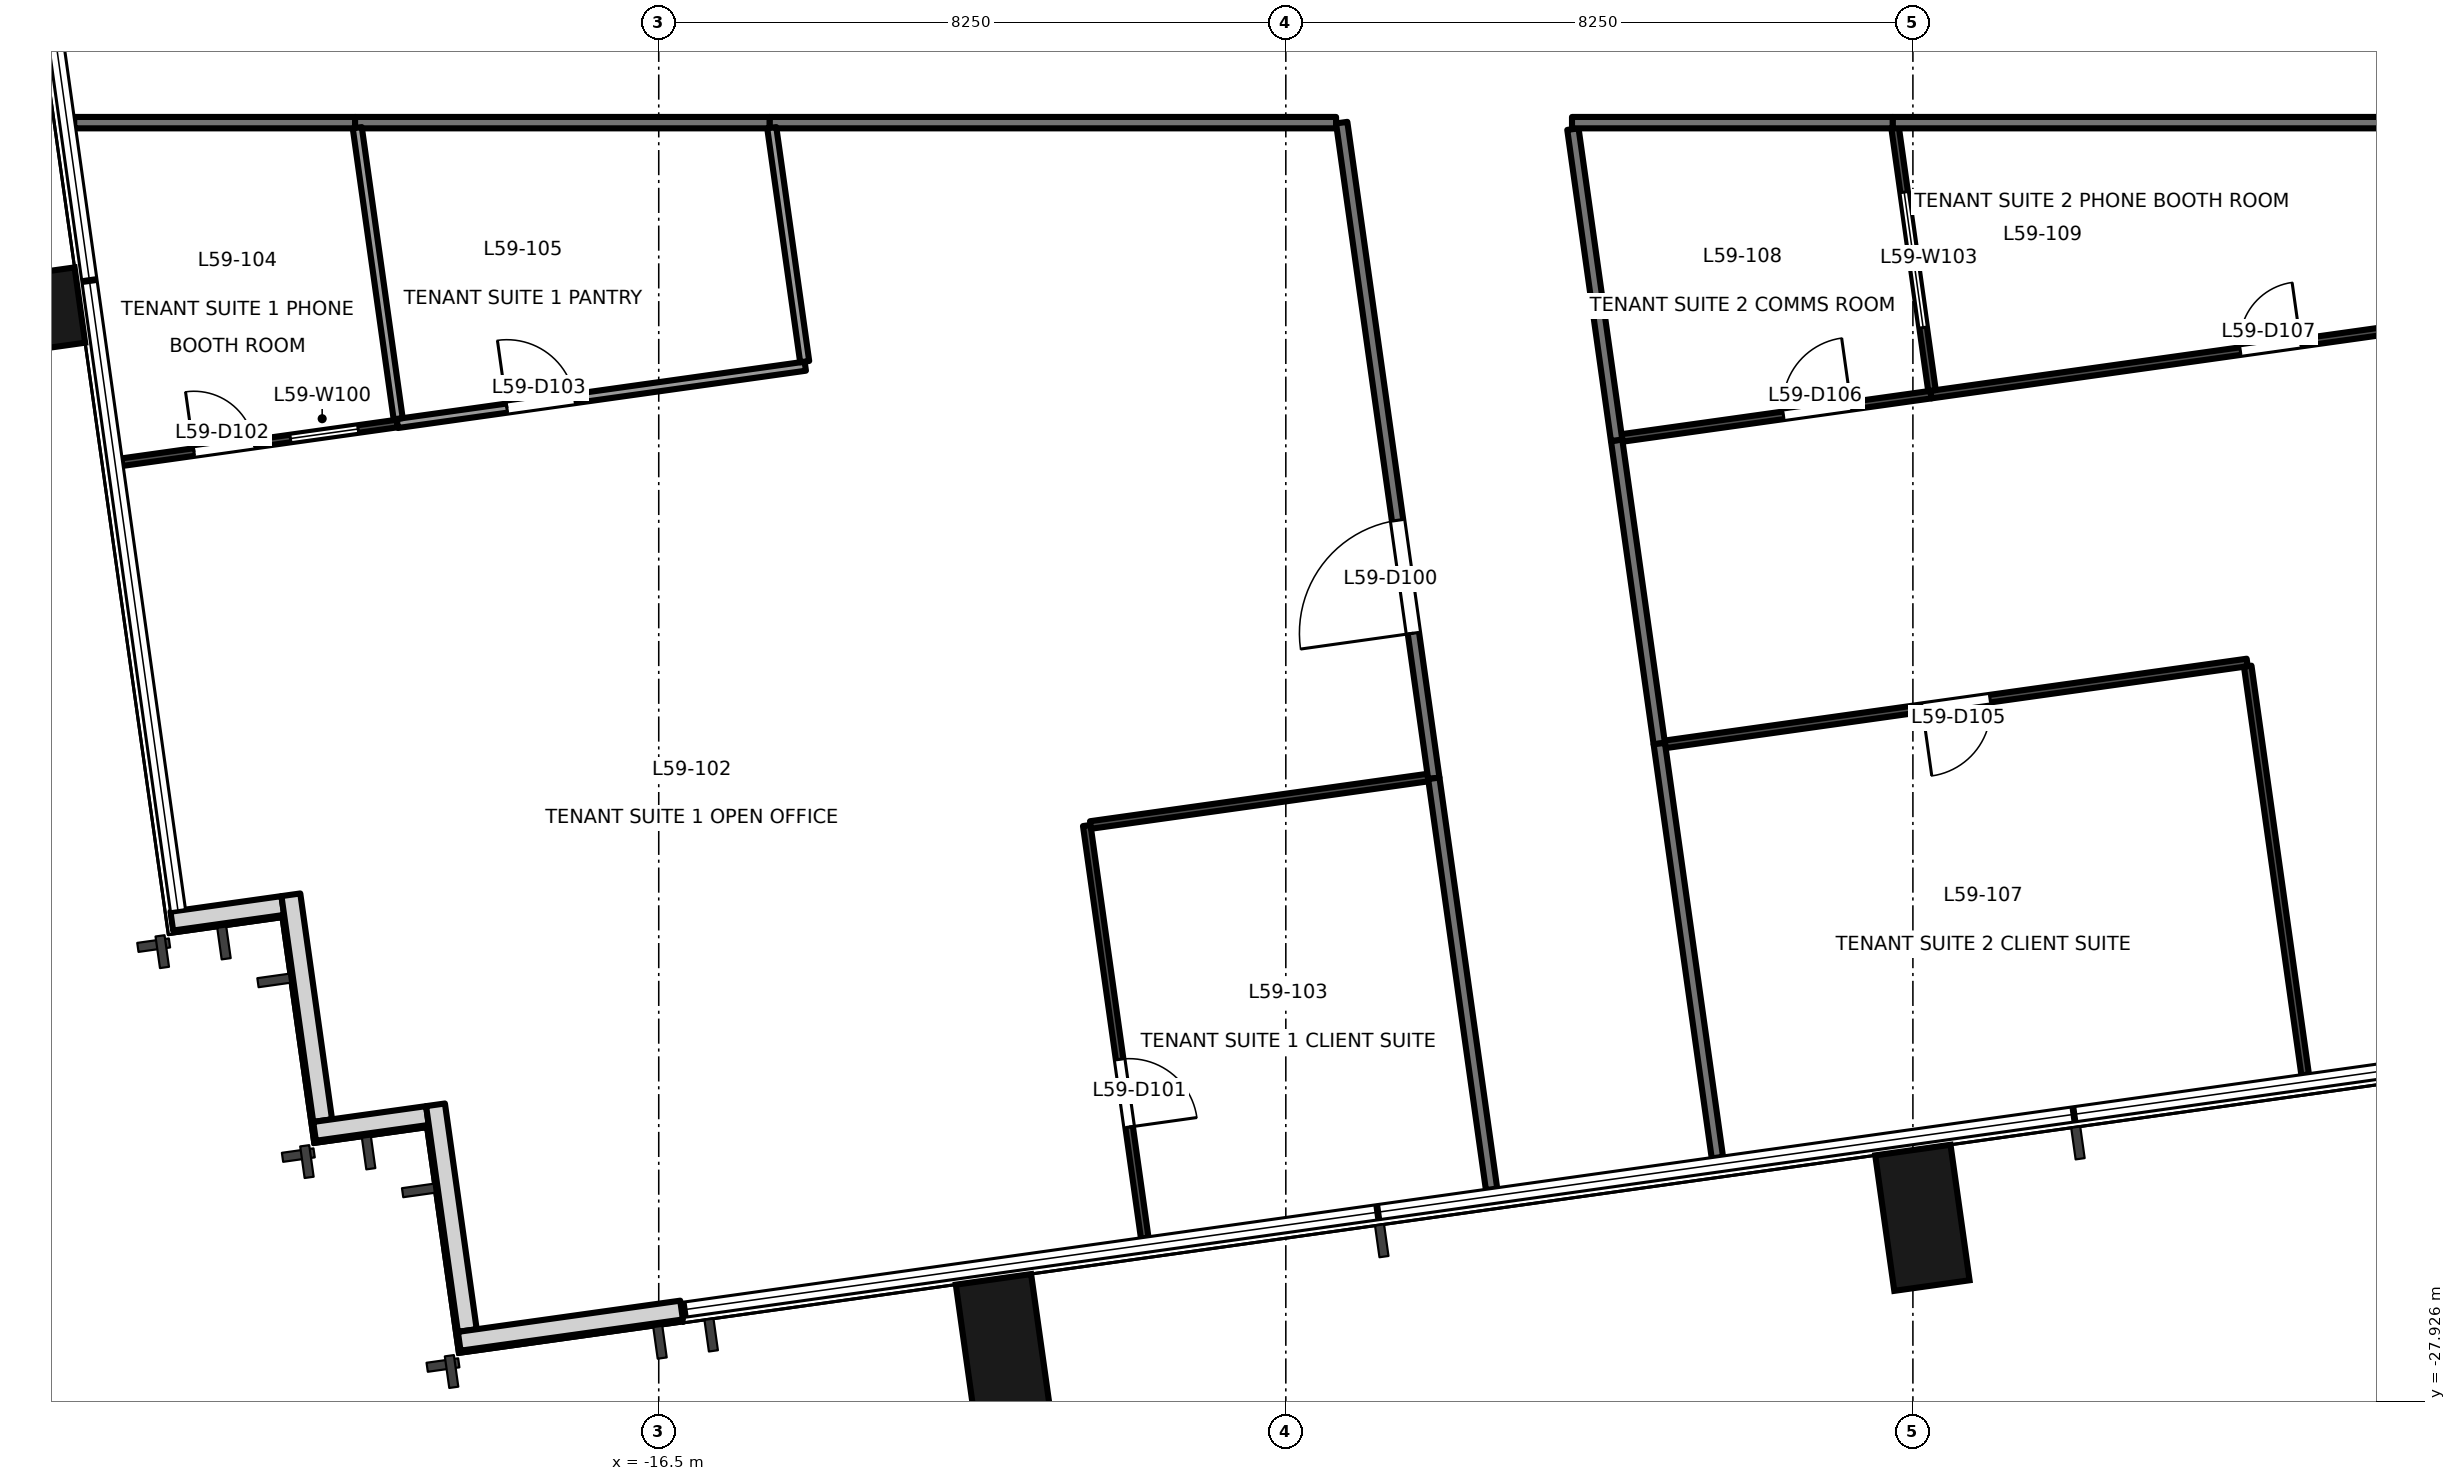
"""IFC4 building model, lengths in metres.
Left out: names, types, materials, properties, quantities, classifications, styles, units other than length and angle.
Written with IfcOpenShell. Run it as: python <this file> out.ifc"""

import sys

from ifc_helpers import new_model, si_unit, direction, frame, frame_2d, origin, origin_2d, place, context, subcontext, project, spatial, rectangle, extrude, element, fill, save


model = new_model("IFC4")
c1 = context("Model", 3, precision=1e-05, world=origin(), true_north=direction((0.0, 1.0)))
c2 = subcontext(c1, "Body", "Model", "MODEL_VIEW")
j1 = project(units=[si_unit("LENGTHUNIT", "METRE"), si_unit("PLANEANGLEUNIT", "RADIAN")], contexts=[c1])
p1 = place(None, origin())
s1 = spatial("IfcSite", under=j1, at=p1, CompositionType="ELEMENT")
p2 = place(p1, origin())
s2 = spatial("IfcBuilding", under=s1, at=p2, CompositionType="ELEMENT")
p3 = place(p2, frame((0.0, 0.0, 259.0)))
s3 = spatial("IfcBuildingStorey", under=s2, at=p3, CompositionType="ELEMENT", Elevation=259.0)
for number, where, z_axis, x_axis in (
    (1, (-11.971, -27.209, -0.2), (0.0, 0.0, 1.0), (0.99, 0.139, 0.0)),
    (2, (0.125, -25.508, -0.2), (0.0, 0.0, 1.0), (0.99, 0.139, 0.0)),
    (3, (-25.007, -13.625, -0.2), (0.0, 0.0, 1.0), (-0.139, 0.99, 0.0)),
):
    element("IfcColumn", number, at=place(p3, frame(where, z_axis=z_axis, x_axis=x_axis)), inside=s3, PredefinedType="COLUMN", context=c2, shape_type="SweptSolid", body=[
        extrude(rectangle(XDim=1.0, YDim=1.8, at=origin_2d()), origin(), (0.0, 0.0, 1.0), 3.9),
    ])
p4 = place(p3, frame((-22.906, -21.605, 0.0), z_axis=(0.0, 0.0, 1.0), x_axis=(0.990235520307, 0.13940449893, 0.0)))
e4 = element("IfcWall", 4, at=p4, inside=s3, PredefinedType="SOLIDWALL", context=c2, shape_type="SweptSolid", body=[
    extrude(rectangle(XDim=1.475, YDim=0.25, at=frame_2d((0.737, 0.0))), origin(), (0.0, 0.0, 1.0), 3.7),
])
p5 = place(p3, frame((-21.34, -21.258, 0.0), z_axis=(0.0, 0.0, 1.0), x_axis=(0.139393225799, -0.990237107263, 0.0)))
e5 = element("IfcWall", 5, at=p5, inside=s3, PredefinedType="SOLIDWALL", context=c2, shape_type="SweptSolid", body=[
    extrude(rectangle(XDim=3.0, YDim=0.25, at=frame_2d((1.5, 0.0))), origin(), (0.0, 0.0, 1.0), 3.7),
])
p6 = place(p3, frame((-21.028, -24.37, 0.0), z_axis=(0.0, 0.0, 1.0), x_axis=(0.990330117064, 0.138730887823, 0.0)))
e6 = element("IfcWall", 6, at=p6, inside=s3, PredefinedType="SOLIDWALL", context=c2, shape_type="SweptSolid", body=[
    extrude(rectangle(XDim=1.499, YDim=0.25, at=frame_2d((0.75, 0.0))), origin(), (0.0, 0.0, 1.0), 3.7),
])
p7 = place(p3, frame((-19.437, -24.021, 0.0), z_axis=(0.0, 0.0, 1.0), x_axis=(0.139358350296, -0.990242015975, 0.0)))
e7 = element("IfcWall", 7, at=p7, inside=s3, PredefinedType="SOLIDWALL", context=c2, shape_type="SweptSolid", body=[
    extrude(rectangle(XDim=2.999, YDim=0.25, at=frame_2d((1.5, 0.0))), origin(), (0.0, 0.0, 1.0), 3.7),
])
p8 = place(p3, frame((-19.125, -27.132, 0.0), z_axis=(0.0, 0.0, 1.0), x_axis=(0.990291981483, 0.139002846771, 0.0)))
e8 = element("IfcWall", 8, at=p8, inside=s3, PredefinedType="SOLIDWALL", context=c2, shape_type="SweptSolid", body=[
    extrude(rectangle(XDim=2.954, YDim=0.25, at=frame_2d((1.477, 0.0))), origin(), (0.0, 0.0, 1.0), 3.7),
])
p9 = place(p3, frame((-7.589, -11.1, 0.0), z_axis=(0.0, 0.0, 1.0), x_axis=(-1.0, 0.0, 0.0)))
e9 = element("IfcWall", 9, at=p9, inside=s3, PredefinedType="PARTITIONING", context=c2, shape_type="SweptSolid", body=[
    extrude(rectangle(XDim=7.453, YDim=0.15, at=frame_2d((3.727, 0.0))), origin(), (0.0, 0.0, 1.0), 2.8),
])
p10 = place(p3, frame((-6.303, -19.726, 0.0), z_axis=(0.0, 0.0, 1.0), x_axis=(-0.139129433731, 0.990274204789, 0.0)))
e10 = element("IfcWall", 10, at=p10, inside=s3, PredefinedType="PARTITIONING", context=c2, shape_type="SweptSolid", body=[
    extrude(rectangle(XDim=8.711, YDim=0.15, at=frame_2d((4.355, 0.0))), origin(), (0.0, 0.0, 1.0), 3.7),
])
p11 = place(p10, frame((1.928, 0.0, 0.0)))
e11 = element("IfcOpeningElement", 11, at=p11, cuts=e10, PredefinedType="OPENING", context=c2, shape_type="SweptSolid", body=[
    extrude(rectangle(XDim=1.5, YDim=2.1, at=frame_2d((0.75, 1.05))), frame((0.0, 0.085, 0.0), z_axis=(0.0, -1.0, 0.0), x_axis=(1.0, 0.0, 0.0)), (0.0, 0.0, 1.0), 0.171),
])
p12 = place(p3, frame((-5.543, -25.133, 0.0), z_axis=(0.0, 0.0, 1.0), x_axis=(-0.139192487281, 0.990265343978, 0.0)))
e12 = element("IfcWall", 12, at=p12, inside=s3, PredefinedType="PARTITIONING", context=c2, shape_type="SweptSolid", body=[
    extrude(rectangle(XDim=5.46, YDim=0.15, at=frame_2d((2.73, 0.0))), origin(), (0.0, 0.0, 1.0), 3.7),
])
p13 = place(p3, frame((-20.495, -11.1, 0.0), z_axis=(0.0, 0.0, 1.0), x_axis=(-1.0, 0.0, 0.0)))
e13 = element("IfcWall", 13, at=p13, inside=s3, PredefinedType="PARTITIONING", context=c2, shape_type="SweptSolid", body=[
    extrude(rectangle(XDim=3.695, YDim=0.15, at=frame_2d((1.847, 0.0))), origin(), (0.0, 0.0, 1.0), 3.7),
])
p14 = place(p3, frame((-15.042, -11.1, 0.0), z_axis=(0.0, 0.0, 1.0), x_axis=(-1.0, 0.0, 0.0)))
e14 = element("IfcWall", 14, at=p14, inside=s3, PredefinedType="PARTITIONING", context=c2, shape_type="SweptSolid", body=[
    extrude(rectangle(XDim=5.453, YDim=0.15, at=frame_2d((2.727, 0.0))), origin(), (0.0, 0.0, 1.0), 3.7),
])
p15 = place(p3, frame((-3.898, -15.279, 0.0), z_axis=(0.0, 0.0, 1.0), x_axis=(0.139240905476, -0.990258537071, 0.0)))
e15 = element("IfcWall", 15, at=p15, inside=s3, PredefinedType="PARTITIONING", context=c2, shape_type="SweptSolid", body=[
    extrude(rectangle(XDim=4.029, YDim=0.15, at=frame_2d((2.015, 0.0))), origin(), (0.0, 0.0, 1.0), 3.7),
])
p16 = place(p3, frame((-3.337, -19.269, 0.0), z_axis=(0.0, 0.0, 1.0), x_axis=(0.139059647431, -0.990284006968, 0.0)))
e16 = element("IfcWall", 16, at=p16, inside=s3, PredefinedType="PARTITIONING", context=c2, shape_type="SweptSolid", body=[
    extrude(rectangle(XDim=5.5, YDim=0.15, at=frame_2d((2.75, 0.0))), origin(), (0.0, 0.0, 1.0), 3.7),
])
p17 = place(p3, frame((-4.473, -11.185, 0.0), z_axis=(0.0, 0.0, 1.0), x_axis=(0.1390729581, -0.990282137739, 0.0)))
e17 = element("IfcWall", 17, at=p17, inside=s3, PredefinedType="PARTITIONING", context=c2, shape_type="SweptSolid", body=[
    extrude(rectangle(XDim=4.134, YDim=0.15, at=frame_2d((2.067, 0.0))), origin(), (0.0, 0.0, 1.0), 2.8),
])
p18 = place(p3, frame((-0.264, -11.1, 0.0), z_axis=(0.0, 0.0, 1.0), x_axis=(-1.0, 0.0, 0.0)))
e18 = element("IfcWall", 18, at=p18, inside=s3, PredefinedType="PARTITIONING", context=c2, shape_type="SweptSolid", body=[
    extrude(rectangle(XDim=4.221, YDim=0.15, at=frame_2d((2.111, 0.0))), origin(), (0.0, 0.0, 1.0), 2.8),
])
p19 = place(p3, frame((8.824, -11.1, 0.0), z_axis=(0.0, 0.0, 1.0), x_axis=(-1.0, 0.0, 0.0)))
e19 = element("IfcWall", 19, at=p19, inside=s3, PredefinedType="PARTITIONING", context=c2, shape_type="SweptSolid", body=[
    extrude(rectangle(XDim=9.088, YDim=0.15, at=frame_2d((4.544, 0.0))), origin(), (0.0, 0.0, 1.0), 2.9),
])
p20 = place(p3, frame((-10.869, -20.347, 0.0), z_axis=(0.0, 0.0, 1.0), x_axis=(0.139213194633, -0.990262433116, 0.0)))
e20 = element("IfcWall", 20, at=p20, inside=s3, PredefinedType="PARTITIONING", context=c2, shape_type="SweptSolid", body=[
    extrude(rectangle(XDim=5.48, YDim=0.1, at=frame_2d((2.74, 0.0))), origin(), (0.0, 0.0, 1.0), 3.7),
])
p21 = place(p20, frame((3.106, 0.0, 0.0)))
e21 = element("IfcOpeningElement", 21, at=p21, cuts=e20, PredefinedType="OPENING", context=c2, shape_type="SweptSolid", body=[
    extrude(rectangle(XDim=0.9, YDim=2.1, at=frame_2d((0.45, 1.05))), frame((0.0, 0.061, 0.0), z_axis=(0.0, -1.0, 0.0), x_axis=(1.0, 0.0, 0.0)), (0.0, 0.0, 1.0), 0.121),
])
p22 = place(p3, frame((-6.38, -19.716, 0.0), z_axis=(0.0, 0.0, 1.0), x_axis=(-0.990263970159, -0.139202260778, 0.0)))
e22 = element("IfcWall", 22, at=p22, inside=s3, PredefinedType="PARTITIONING", context=c2, shape_type="SweptSolid", body=[
    extrude(rectangle(XDim=4.483, YDim=0.1, at=frame_2d((2.241, 0.0))), origin(), (0.0, 0.0, 1.0), 2.8),
])
p23 = place(p3, frame((-23.563, -15.567, 0.0), z_axis=(0.0, 0.0, 1.0), x_axis=(0.990288176908, 0.139029948846, 0.0)))
e23 = element("IfcWall", 23, at=p23, inside=s3, PredefinedType="PARTITIONING", context=c2, shape_type="SweptSolid", body=[
    extrude(rectangle(XDim=3.66, YDim=0.1, at=frame_2d((1.83, 0.0))), origin(), (0.0, 0.0, 1.0), 3.7),
])
p24 = place(p23, frame((0.958, 0.0, 0.0)))
e24 = element("IfcOpeningElement", 24, at=p24, cuts=e23, PredefinedType="OPENING", context=c2, shape_type="SweptSolid", body=[
    extrude(rectangle(XDim=0.8, YDim=2.1, at=frame_2d((0.4, 1.05))), frame((0.0, 0.061, 0.0), z_axis=(0.0, -1.0, 0.0), x_axis=(1.0, 0.0, 0.0)), (0.0, 0.0, 1.0), 0.121),
])
p25 = place(p23, frame((2.239, 0.0, 0.9)))
e25 = element("IfcOpeningElement", 25, at=p25, cuts=e23, PredefinedType="OPENING", context=c2, shape_type="SweptSolid", body=[
    extrude(rectangle(XDim=0.9, YDim=1.2, at=frame_2d((0.45, 0.6))), frame((0.0, 0.061, 0.0), z_axis=(0.0, -1.0, 0.0), x_axis=(1.0, 0.0, 0.0)), (0.0, 0.0, 1.0), 0.121),
])
p26 = place(p3, frame((-19.939, -15.058, 0.0), z_axis=(0.0, 0.0, 1.0), x_axis=(0.99027122958, 0.139150608569, 0.0)))
e26 = element("IfcWall", 26, at=p26, inside=s3, PredefinedType="PARTITIONING", context=c2, shape_type="SweptSolid", body=[
    extrude(rectangle(XDim=5.42, YDim=0.12, at=frame_2d((2.71, 0.0))), origin(), (0.0, 0.0, 1.0), 3.7),
])
p27 = place(p26, frame((1.456, 0.0, 0.0)))
e27 = element("IfcOpeningElement", 27, at=p27, cuts=e26, PredefinedType="OPENING", context=c2, shape_type="SweptSolid", body=[
    extrude(rectangle(XDim=0.9, YDim=2.1, at=frame_2d((0.45, 1.05))), frame((0.0, 0.071, 0.0), z_axis=(0.0, -1.0, 0.0), x_axis=(1.0, 0.0, 0.0)), (0.0, 0.0, 1.0), 0.141),
])
p28 = place(p3, frame((-14.58, -14.244, 0.0), z_axis=(0.0, 0.0, 1.0), x_axis=(-0.139309006135, 0.990248959005, 0.0)))
e28 = element("IfcWall", 28, at=p28, inside=s3, PredefinedType="PARTITIONING", context=c2, shape_type="SweptSolid", body=[
    extrude(rectangle(XDim=3.107, YDim=0.12, at=frame_2d((1.554, 0.0))), origin(), (0.0, 0.0, 1.0), 3.7),
])
p29 = place(p3, frame((-20.466, -11.167, 0.0), z_axis=(0.0, 0.0, 1.0), x_axis=(0.139192901143, -0.990265285806, 0.0)))
e29 = element("IfcWall", 29, at=p29, inside=s3, PredefinedType="PARTITIONING", context=c2, shape_type="SweptSolid", body=[
    extrude(rectangle(XDim=3.866, YDim=0.12, at=frame_2d((1.933, 0.0))), origin(), (0.0, 0.0, 1.0), 3.7),
])
p30 = place(p3, frame((4.398, -18.202, 0.0), z_axis=(0.0, 0.0, 1.0), x_axis=(-0.990252156894, -0.139286272714, 0.0)))
e30 = element("IfcWall", 30, at=p30, inside=s3, PredefinedType="PARTITIONING", context=c2, shape_type="SweptSolid", body=[
    extrude(rectangle(XDim=7.733, YDim=0.1, at=frame_2d((3.867, 0.0))), origin(), (0.0, 0.0, 1.0), 2.9),
])
p31 = place(p30, frame((3.417, 0.0, 0.0)))
e31 = element("IfcOpeningElement", 31, at=p31, cuts=e30, PredefinedType="OPENING", context=c2, shape_type="SweptSolid", body=[
    extrude(rectangle(XDim=0.9, YDim=2.1, at=frame_2d((0.45, 1.05))), frame((0.0, 0.061, 0.0), z_axis=(0.0, -1.0, 0.0), x_axis=(1.0, 0.0, 0.0)), (0.0, 0.0, 1.0), 0.121),
])
p32 = place(p3, frame((5.161, -23.628, 0.0), z_axis=(0.0, 0.0, 1.0), x_axis=(-0.139205228836, 0.990263552932, 0.0)))
e32 = element("IfcWall", 32, at=p32, inside=s3, PredefinedType="PARTITIONING", context=c2, shape_type="SweptSolid", body=[
    extrude(rectangle(XDim=5.43, YDim=0.1, at=frame_2d((2.715, 0.0))), origin(), (0.0, 0.0, 1.0), 2.9),
])
p33 = place(p3, frame((-3.826, -15.248, 0.0), z_axis=(0.0, 0.0, 1.0), x_axis=(0.990304461309, 0.138913908276, 0.0)))
e33 = element("IfcWall", 33, at=p33, inside=s3, PredefinedType="PARTITIONING", context=c2, shape_type="SweptSolid", body=[
    extrude(rectangle(XDim=4.104, YDim=0.1, at=frame_2d((2.052, 0.0))), origin(), (0.0, 0.0, 1.0), 2.9),
])
p34 = place(p33, frame((2.143, 0.0, 0.0)))
e34 = element("IfcOpeningElement", 34, at=p34, cuts=e33, PredefinedType="OPENING", context=c2, shape_type="SweptSolid", body=[
    extrude(rectangle(XDim=0.9, YDim=2.1, at=frame_2d((0.45, 1.05))), frame((0.0, 0.061, 0.0), z_axis=(0.0, -1.0, 0.0), x_axis=(1.0, 0.0, 0.0)), (0.0, 0.0, 1.0), 0.121),
])
p35 = place(p3, frame((0.238, -14.678, 0.0), z_axis=(0.0, 0.0, 1.0), x_axis=(0.990261534953, 0.139219583367, 0.0)))
e35 = element("IfcWall", 35, at=p35, inside=s3, PredefinedType="PARTITIONING", context=c2, shape_type="SweptSolid", body=[
    extrude(rectangle(XDim=9.021, YDim=0.1, at=frame_2d((4.51, 0.0))), origin(), (0.0, 0.0, 1.0), 2.9),
])
p36 = place(p35, frame((4.11, 0.0, 0.0)))
e36 = element("IfcOpeningElement", 36, at=p36, cuts=e35, PredefinedType="OPENING", context=c2, shape_type="SweptSolid", body=[
    extrude(rectangle(XDim=0.8, YDim=2.1, at=frame_2d((0.4, 1.05))), frame((0.0, 0.061, 0.0), z_axis=(0.0, -1.0, 0.0), x_axis=(1.0, 0.0, 0.0)), (0.0, 0.0, 1.0), 0.121),
])
p37 = place(p35, frame((6.041, 0.0, 0.9)))
e37 = element("IfcOpeningElement", 37, at=p37, cuts=e35, PredefinedType="OPENING", context=c2, shape_type="SweptSolid", body=[
    extrude(rectangle(XDim=1.8, YDim=1.2, at=frame_2d((0.9, 0.6))), frame((0.0, 0.061, 0.0), z_axis=(0.0, -1.0, 0.0), x_axis=(1.0, 0.0, 0.0)), (0.0, 0.0, 1.0), 0.121),
])
p38 = place(p3, frame((-0.234, -11.168, 0.0), z_axis=(0.0, 0.0, 1.0), x_axis=(0.138894773338, -0.990307145253, 0.0)))
e38 = element("IfcWall", 38, at=p38, inside=s3, PredefinedType="PARTITIONING", context=c2, shape_type="SweptSolid", body=[
    extrude(rectangle(XDim=3.491, YDim=0.1, at=frame_2d((1.746, 0.0))), origin(), (0.0, 0.0, 1.0), 2.9),
])
p39 = place(p38, frame((0.854, 0.0, 0.9)))
e39 = element("IfcOpeningElement", 39, at=p39, cuts=e38, PredefinedType="OPENING", context=c2, shape_type="SweptSolid", body=[
    extrude(rectangle(XDim=1.8, YDim=1.2, at=frame_2d((0.9, 0.6))), frame((0.0, 0.061, 0.0), z_axis=(0.0, -1.0, 0.0), x_axis=(1.0, 0.0, 0.0)), (0.0, 0.0, 1.0), 0.121),
])
p40 = place(p11, origin())
e40 = element("IfcDoor", 40, at=p40, inside=s3, OperationType="DOUBLE_DOOR_SINGLE_SWING", PredefinedType="DOOR", context=c2, shape_type="SweptSolid", body=[
    extrude(rectangle(XDim=1.5, YDim=2.1, at=frame_2d((0.75, 1.05))), frame((0.0, 0.025, 0.0), z_axis=(0.0, -1.0, 0.0), x_axis=(1.0, 0.0, 0.0)), (0.0, 0.0, 1.0), 0.05),
])
fill(e11, e40)
p41 = place(p21, origin())
e41 = element("IfcDoor", 41, at=p41, inside=s3, OperationType="SINGLE_SWING_RIGHT", PredefinedType="DOOR", context=c2, shape_type="SweptSolid", body=[
    extrude(rectangle(XDim=0.9, YDim=2.1, at=frame_2d((0.45, 1.05))), frame((0.0, 0.025, 0.0), z_axis=(0.0, -1.0, 0.0), x_axis=(1.0, 0.0, 0.0)), (0.0, 0.0, 1.0), 0.05),
])
fill(e21, e41)
p42 = place(p24, origin())
e42 = element("IfcDoor", 42, at=p42, inside=s3, OperationType="SINGLE_SWING_LEFT", PredefinedType="DOOR", context=c2, shape_type="SweptSolid", body=[
    extrude(rectangle(XDim=0.8, YDim=2.1, at=frame_2d((0.4, 1.05))), frame((0.0, 0.025, 0.0), z_axis=(0.0, -1.0, 0.0), x_axis=(1.0, 0.0, 0.0)), (0.0, 0.0, 1.0), 0.05),
])
fill(e24, e42)
p43 = place(p27, origin())
e43 = element("IfcDoor", 43, at=p43, inside=s3, OperationType="SINGLE_SWING_LEFT", PredefinedType="DOOR", context=c2, shape_type="SweptSolid", body=[
    extrude(rectangle(XDim=0.9, YDim=2.1, at=frame_2d((0.45, 1.05))), frame((0.0, 0.025, 0.0), z_axis=(0.0, -1.0, 0.0), x_axis=(1.0, 0.0, 0.0)), (0.0, 0.0, 1.0), 0.05),
])
fill(e27, e43)
p44 = place(p31, origin())
e44 = element("IfcDoor", 44, at=p44, inside=s3, OperationType="SINGLE_SWING_RIGHT", PredefinedType="DOOR", context=c2, shape_type="SweptSolid", body=[
    extrude(rectangle(XDim=0.9, YDim=2.1, at=frame_2d((0.45, 1.05))), frame((0.0, 0.025, 0.0), z_axis=(0.0, -1.0, 0.0), x_axis=(1.0, 0.0, 0.0)), (0.0, 0.0, 1.0), 0.05),
])
fill(e31, e44)
p45 = place(p34, origin())
e45 = element("IfcDoor", 45, at=p45, inside=s3, OperationType="SINGLE_SWING_RIGHT", PredefinedType="DOOR", context=c2, shape_type="SweptSolid", body=[
    extrude(rectangle(XDim=0.9, YDim=2.1, at=frame_2d((0.45, 1.05))), frame((0.0, 0.025, 0.0), z_axis=(0.0, -1.0, 0.0), x_axis=(1.0, 0.0, 0.0)), (0.0, 0.0, 1.0), 0.05),
])
fill(e34, e45)
p46 = place(p36, origin())
e46 = element("IfcDoor", 46, at=p46, inside=s3, OperationType="SINGLE_SWING_RIGHT", PredefinedType="DOOR", context=c2, shape_type="SweptSolid", body=[
    extrude(rectangle(XDim=0.8, YDim=2.1, at=frame_2d((0.4, 1.05))), frame((0.0, 0.025, 0.0), z_axis=(0.0, -1.0, 0.0), x_axis=(1.0, 0.0, 0.0)), (0.0, 0.0, 1.0), 0.05),
])
fill(e36, e46)
p47 = place(p25, origin())
e47 = element("IfcWindow", 47, at=p47, inside=s3, PartitioningType="SINGLE_PANEL", PredefinedType="WINDOW", context=c2, shape_type="SweptSolid", body=[
    extrude(rectangle(XDim=0.9, YDim=1.2, at=frame_2d((0.45, 0.6))), frame((0.0, 0.03, 0.0), z_axis=(0.0, -1.0, 0.0), x_axis=(1.0, 0.0, 0.0)), (0.0, 0.0, 1.0), 0.06),
])
fill(e25, e47)
p48 = place(p39, origin())
e48 = element("IfcWindow", 48, at=p48, inside=s3, PartitioningType="SINGLE_PANEL", PredefinedType="WINDOW", context=c2, shape_type="SweptSolid", body=[
    extrude(rectangle(XDim=1.8, YDim=1.2, at=frame_2d((0.9, 0.6))), frame((0.0, 0.03, 0.0), z_axis=(0.0, -1.0, 0.0), x_axis=(1.0, 0.0, 0.0)), (0.0, 0.0, 1.0), 0.06),
])
fill(e39, e48)
save(model, sys.argv[1])
